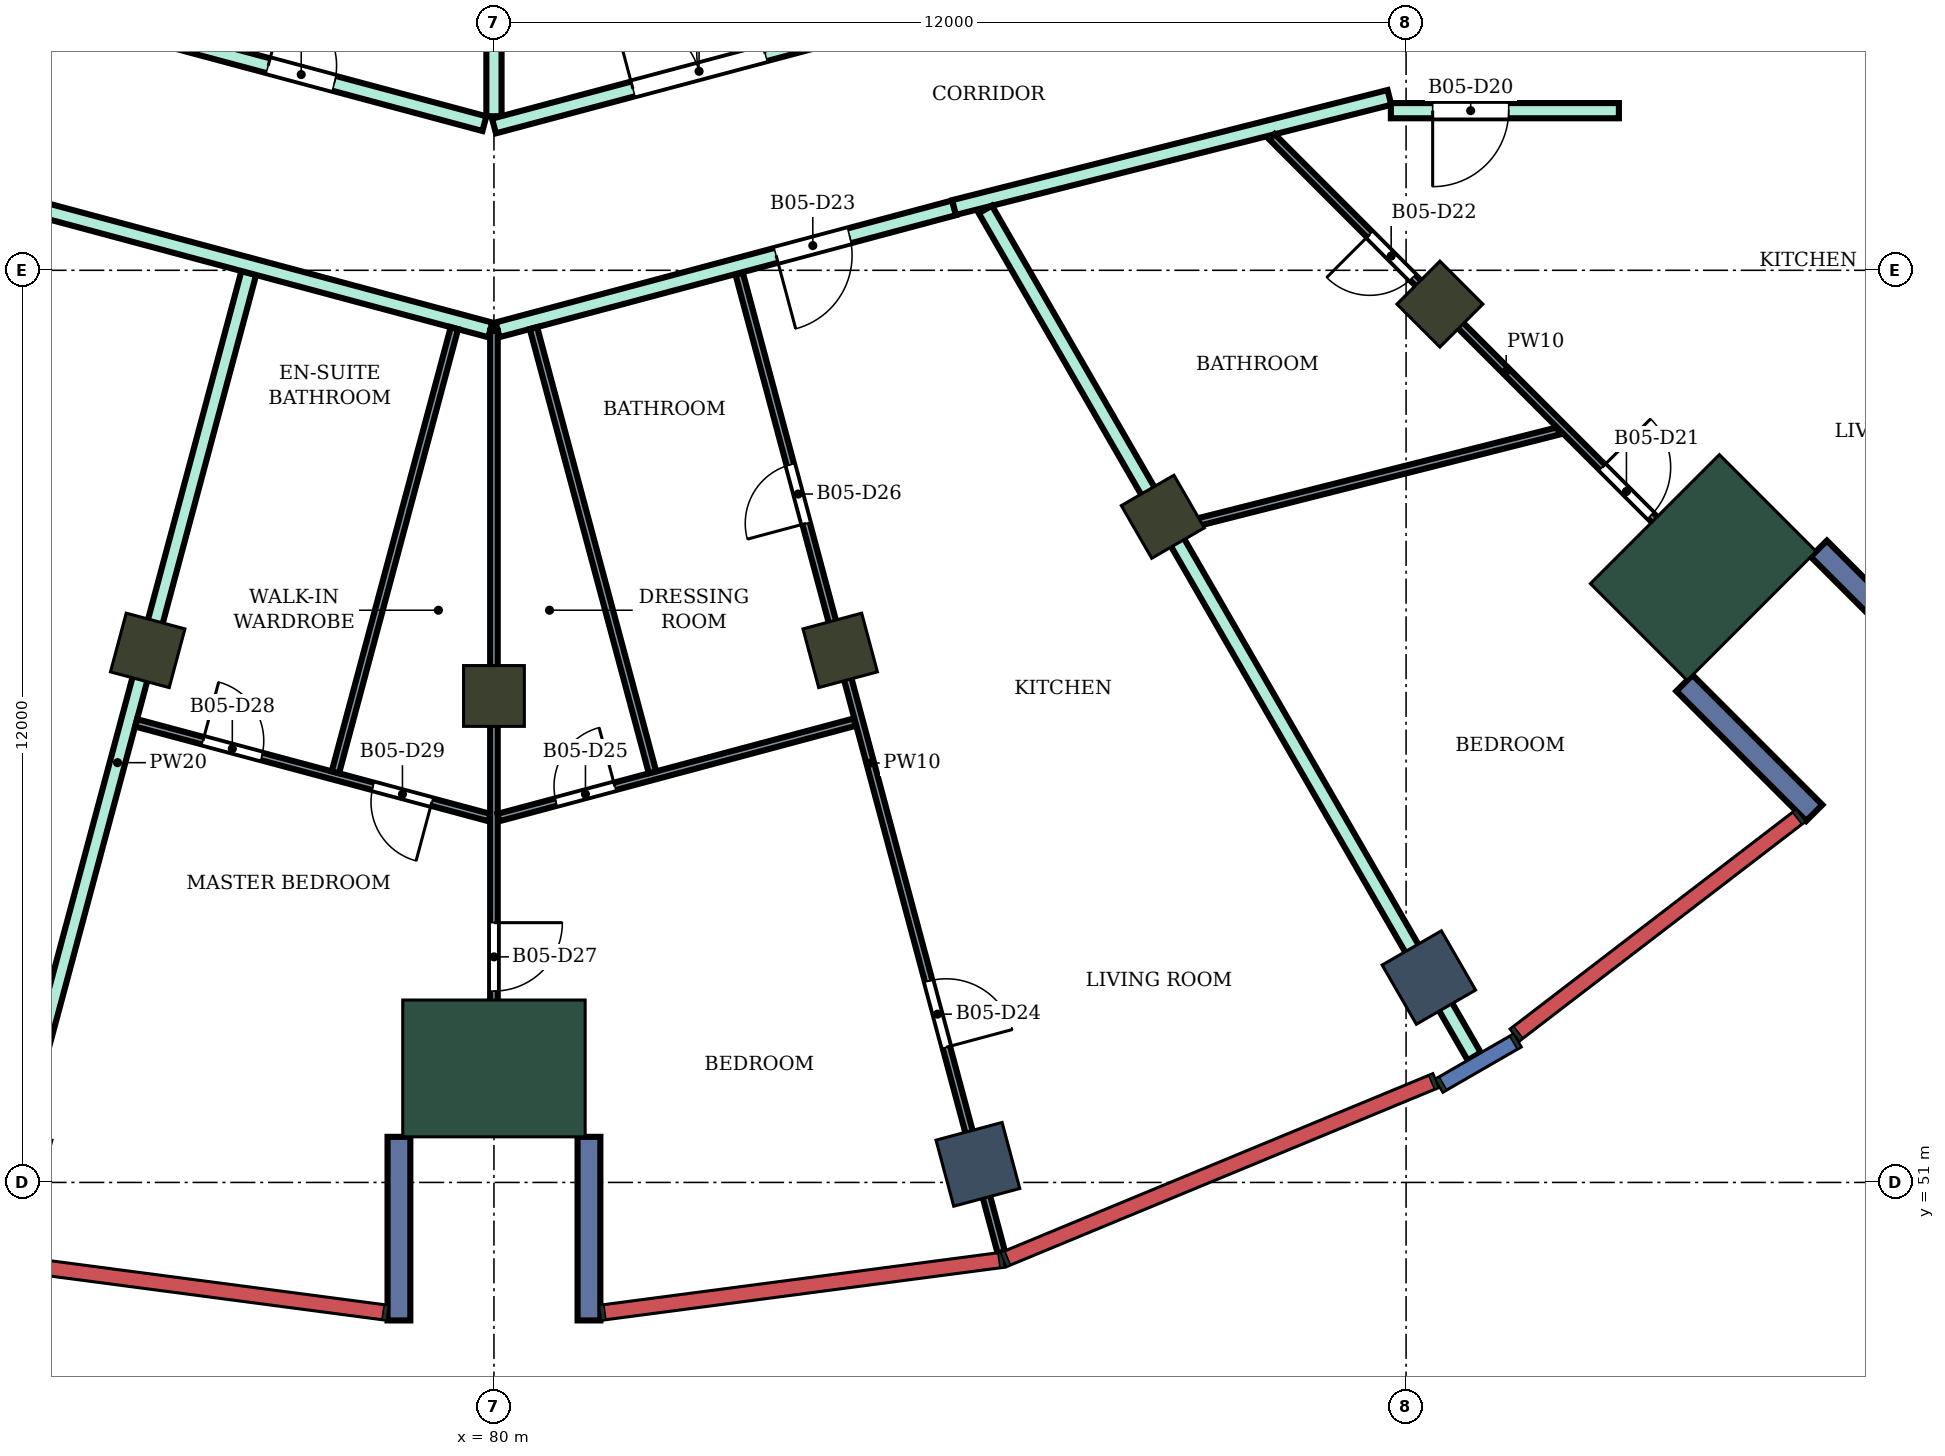
"""IFC4 building model, lengths in metres.
Left out: names, types, materials, properties, quantities, classifications, styles, units other than length and angle.
Written with IfcOpenShell. Run it as: python <this file> out.ifc"""

import sys

from ifc_helpers import new_model, si_unit, direction, frame, frame_2d, origin, origin_2d, place, context, subcontext, project, spatial, rectangle, extrude, element, fill, save


model = new_model("IFC4")
c1 = context("Model", 3, precision=1e-05, world=origin(), true_north=direction((0.0, 1.0)))
c2 = subcontext(c1, "Body", "Model", "MODEL_VIEW")
j1 = project(units=[si_unit("LENGTHUNIT", "METRE"), si_unit("PLANEANGLEUNIT", "RADIAN")], contexts=[c1])
p1 = place(None, origin())
s1 = spatial("IfcSite", under=j1, at=p1, CompositionType="ELEMENT")
p2 = place(p1, origin())
s2 = spatial("IfcBuilding", under=s1, at=p2, CompositionType="ELEMENT")
p3 = place(p2, frame((0.0, 0.0, 266.7)))
s3 = spatial("IfcBuildingStorey", under=s2, at=p3, CompositionType="ELEMENT", Elevation=266.7)
for number, where, z_axis, x_axis in (
    (1, (86.367, 51.238, 0.0), (0.0, 0.0, 1.0), (0.259, -0.966, 0.0)),
    (2, (92.3, 53.696, 0.0), (0.0, 0.0, 1.0), (0.5, -0.866, 0.0)),
):
    element("IfcColumn", number, at=place(p3, frame(where, z_axis=z_axis, x_axis=x_axis)), inside=s3, PredefinedType="COLUMN", context=c2, shape_type="SweptSolid", body=[
        extrude(rectangle(XDim=0.9, YDim=0.9, at=origin_2d()), origin(), (0.0, 0.0, 1.0), 4.2),
    ])
for number, where, z_axis, x_axis in (
    (3, (75.445, 58.0, 0.0), (0.0, 0.0, 1.0), (-0.259, -0.966, 0.0)),
    (4, (80.0, 57.4, 0.0), (0.0, 0.0, 1.0), (0.0, -1.0, 0.0)),
    (5, (84.555, 58.0, 0.0), (0.0, 0.0, 1.0), (0.259, -0.966, 0.0)),
    (6, (88.8, 59.758, 0.0), (0.0, 0.0, 1.0), (0.5, -0.866, 0.0)),
    (7, (92.445, 62.555, 0.0), (0.0, 0.0, 1.0), (0.707, -0.707, 0.0)),
):
    element("IfcColumn", number, at=place(p3, frame(where, z_axis=z_axis, x_axis=x_axis)), inside=s3, PredefinedType="COLUMN", context=c2, shape_type="SweptSolid", body=[
        extrude(rectangle(XDim=0.8, YDim=0.8, at=origin_2d()), origin(), (0.0, 0.0, 1.0), 4.2),
    ])
for number, where, z_axis, x_axis in (
    (8, (80.0, 52.5, 0.0), (0.0, 0.0, 1.0), (0.0, -1.0, 0.0)),
    (9, (95.91, 59.09, 0.0), (0.0, 0.0, 1.0), (0.707, -0.707, 0.0)),
):
    element("IfcColumn", number, at=place(p3, frame(where, z_axis=z_axis, x_axis=x_axis)), inside=s3, PredefinedType="COLUMN", context=c2, shape_type="SweptSolid", body=[
        extrude(rectangle(XDim=1.8, YDim=2.4, at=origin_2d()), origin(), (0.0, 0.0, 1.0), 4.2),
    ])
for number, where, z_axis, x_axis in (
    (10, (78.75, 51.6, 0.0), (0.0, 0.0, 1.0), (0.0, -1.0, 0.0)),
    (11, (81.25, 51.6, 0.0), (0.0, 0.0, 1.0), (0.0, -1.0, 0.0)),
    (12, (95.662, 57.57, 0.0), (0.0, 0.0, 1.0), (0.707, -0.707, 0.0)),
    (13, (97.43, 59.338, 0.0), (0.0, 0.0, 1.0), (0.707, -0.707, 0.0)),
):
    element("IfcWall", number, at=place(p3, frame(where, z_axis=z_axis, x_axis=x_axis)), inside=s3, PredefinedType="NOTDEFINED", context=c2, shape_type="SweptSolid", body=[
        extrude(rectangle(XDim=2.416, YDim=0.3, at=frame_2d((1.208, 0.0))), origin(), (0.0, 0.0, 1.0), 4.2),
    ])
p4 = place(p3, frame((73.32, 50.082, 0.0), z_axis=(0.0, 0.0, 1.0), x_axis=(0.258966962665, 0.965886179758, 0.0)))
e14 = element("IfcWall", 14, at=p4, inside=s3, PredefinedType="PARTITIONING", context=c2, shape_type="SweptSolid", body=[
    extrude(rectangle(XDim=13.337, YDim=0.2, at=frame_2d((6.668, 0.0))), origin(), (0.0, 0.0, 1.0), 3.75),
])
p5 = place(p3, frame((73.947, 63.826, 0.0), z_axis=(0.0, 0.0, 1.0), x_axis=(0.965856500469, -0.259077634122, 0.0)))
e15 = element("IfcWall", 15, at=p5, inside=s3, PredefinedType="PARTITIONING", context=c2, shape_type="SweptSolid", body=[
    extrude(rectangle(XDim=6.217, YDim=0.2, at=frame_2d((3.108, 0.0))), origin(), (0.0, 0.0, 1.0), 3.75),
])
p6 = place(p3, frame((74.603, 66.342, 0.0), z_axis=(0.0, 0.0, 1.0), x_axis=(0.965920893652, -0.258837453254, 0.0)))
e16 = element("IfcWall", 16, at=p6, inside=s3, PredefinedType="PARTITIONING", context=c2, shape_type="SweptSolid", body=[
    extrude(rectangle(XDim=5.458, YDim=0.2, at=frame_2d((2.729, 0.0))), origin(), (0.0, 0.0, 1.0), 3.75),
])
p7 = place(p6, frame((2.512, 0.0, 0.0)))
e17 = element("IfcOpeningElement", 17, at=p7, cuts=e16, PredefinedType="OPENING", context=c2, shape_type="SweptSolid", body=[
    extrude(rectangle(XDim=0.9, YDim=2.1, at=frame_2d((0.45, 1.05))), frame((0.0, 0.11, 0.0), z_axis=(0.0, -1.0, 0.0), x_axis=(1.0, 0.0, 0.0)), (0.0, 0.0, 1.0), 0.22),
])
p8 = place(p3, frame((80.048, 62.217, 0.0), z_axis=(0.0, 0.0, 1.0), x_axis=(0.966097920642, 0.258175923996, 0.0)))
e18 = element("IfcWall", 18, at=p8, inside=s3, PredefinedType="PARTITIONING", context=c2, shape_type="SweptSolid", body=[
    extrude(rectangle(XDim=6.217, YDim=0.2, at=frame_2d((3.108, 0.0))), origin(), (0.0, 0.0, 1.0), 3.75),
])
p9 = place(p8, frame((3.792, 0.0, 0.0)))
e19 = element("IfcOpeningElement", 19, at=p9, cuts=e18, PredefinedType="OPENING", context=c2, shape_type="SweptSolid", body=[
    extrude(rectangle(XDim=1.0, YDim=2.1, at=frame_2d((0.5, 1.05))), frame((0.0, 0.11, 0.0), z_axis=(0.0, -1.0, 0.0), x_axis=(1.0, 0.0, 0.0)), (0.0, 0.0, 1.0), 0.22),
])
p10 = place(p3, frame((80.0, 65.027, 0.0), z_axis=(0.0, 0.0, 1.0), x_axis=(0.0, 1.0, 0.0)))
e20 = element("IfcWall", 20, at=p10, inside=s3, PredefinedType="PARTITIONING", context=c2, shape_type="SweptSolid", body=[
    extrude(rectangle(XDim=2.273, YDim=0.2, at=frame_2d((1.136, 0.0))), origin(), (0.0, 0.0, 1.0), 3.75),
])
p11 = place(p3, frame((80.0, 64.898, 0.0), z_axis=(0.0, 0.0, 1.0), x_axis=(0.966236923997, 0.25765520896, 0.0)))
e21 = element("IfcWall", 21, at=p11, inside=s3, PredefinedType="PARTITIONING", context=c2, shape_type="SweptSolid", body=[
    extrude(rectangle(XDim=8.168, YDim=0.2, at=frame_2d((4.084, 0.0))), origin(), (0.0, 0.0, 1.0), 3.75),
])
p12 = place(p11, frame((1.893, 0.0, 0.0)))
e22 = element("IfcOpeningElement", 22, at=p12, cuts=e21, PredefinedType="OPENING", context=c2, shape_type="SweptSolid", body=[
    extrude(rectangle(XDim=1.8, YDim=2.1, at=frame_2d((0.9, 1.05))), frame((0.0, 0.11, 0.0), z_axis=(0.0, -1.0, 0.0), x_axis=(1.0, 0.0, 0.0)), (0.0, 0.0, 1.0), 0.22),
])
p13 = place(p3, frame((86.053, 63.826, 0.0), z_axis=(0.0, 0.0, 1.0), x_axis=(0.969490004987, 0.245130843083, 0.0)))
e23 = element("IfcWall", 23, at=p13, inside=s3, PredefinedType="PARTITIONING", context=c2, shape_type="SweptSolid", body=[
    extrude(rectangle(XDim=5.908, YDim=0.2, at=frame_2d((2.954, 0.0))), origin(), (0.0, 0.0, 1.0), 3.75),
])
p14 = place(p3, frame((86.465, 63.801, 0.0), z_axis=(0.0, 0.0, 1.0), x_axis=(0.499914633865, -0.866074684336, 0.0)))
e24 = element("IfcWall", 24, at=p14, inside=s3, PredefinedType="PARTITIONING", context=c2, shape_type="SweptSolid", body=[
    extrude(rectangle(XDim=12.866, YDim=0.2, at=frame_2d((6.433, 0.0))), origin(), (0.0, 0.0, 1.0), 3.75),
])
p15 = place(p3, frame((91.8, 65.1, 0.0), z_axis=(0.0, 0.0, 1.0), x_axis=(1.0, 0.0, 0.0)))
e25 = element("IfcWall", 25, at=p15, inside=s3, PredefinedType="PARTITIONING", context=c2, shape_type="SweptSolid", body=[
    extrude(rectangle(XDim=3.0, YDim=0.2, at=frame_2d((1.5, 0.0))), origin(), (0.0, 0.0, 1.0), 3.75),
])
p16 = place(p15, frame((0.55, 0.0, 0.0)))
e26 = element("IfcOpeningElement", 26, at=p16, cuts=e25, PredefinedType="OPENING", context=c2, shape_type="SweptSolid", body=[
    extrude(rectangle(XDim=1.0, YDim=2.1, at=frame_2d((0.5, 1.05))), frame((0.0, 0.11, 0.0), z_axis=(0.0, -1.0, 0.0), x_axis=(1.0, 0.0, 0.0)), (0.0, 0.0, 1.0), 0.22),
])
p17 = place(p3, frame((75.293, 57.046, 0.0), z_axis=(0.0, 0.0, 1.0), x_axis=(0.965904119246, -0.258900043306, 0.0)))
e27 = element("IfcWall", 27, at=p17, inside=s3, PredefinedType="PARTITIONING", context=c2, shape_type="SweptSolid", body=[
    extrude(rectangle(XDim=4.813, YDim=0.1, at=frame_2d((2.406, 0.0))), origin(), (0.0, 0.0, 1.0), 3.75),
])
p18 = place(p17, frame((0.91, 0.0, 0.0)))
e28 = element("IfcOpeningElement", 28, at=p18, cuts=e27, PredefinedType="OPENING", context=c2, shape_type="SweptSolid", body=[
    extrude(rectangle(XDim=0.8, YDim=2.1, at=frame_2d((0.4, 1.05))), frame((0.0, 0.06, 0.0), z_axis=(0.0, -1.0, 0.0), x_axis=(1.0, 0.0, 0.0)), (0.0, 0.0, 1.0), 0.12),
])
p19 = place(p17, frame((3.227, 0.0, 0.0)))
e29 = element("IfcOpeningElement", 29, at=p19, cuts=e27, PredefinedType="OPENING", context=c2, shape_type="SweptSolid", body=[
    extrude(rectangle(XDim=0.8, YDim=2.1, at=frame_2d((0.4, 1.05))), frame((0.0, 0.06, 0.0), z_axis=(0.0, -1.0, 0.0), x_axis=(1.0, 0.0, 0.0)), (0.0, 0.0, 1.0), 0.12),
])
p20 = place(p3, frame((77.914, 56.396, 0.0), z_axis=(0.0, 0.0, 1.0), x_axis=(0.258822816874, 0.965924815638, 0.0)))
e30 = element("IfcWall", 30, at=p20, inside=s3, PredefinedType="PARTITIONING", context=c2, shape_type="SweptSolid", body=[
    extrude(rectangle(XDim=6.05, YDim=0.1, at=frame_2d((3.025, 0.0))), origin(), (0.0, 0.0, 1.0), 3.75),
])
p21 = place(p3, frame((80.0, 51.8, 0.0), z_axis=(0.0, 0.0, 1.0), x_axis=(0.0, 1.0, 0.0)))
e31 = element("IfcWall", 31, at=p21, inside=s3, PredefinedType="PARTITIONING", context=c2, shape_type="SweptSolid", body=[
    extrude(rectangle(XDim=10.404, YDim=0.1, at=frame_2d((5.202, 0.0))), origin(), (0.0, 0.0, 1.0), 3.75),
])
p22 = place(p21, frame((1.718, 0.0, 0.0)))
e32 = element("IfcOpeningElement", 32, at=p22, cuts=e31, PredefinedType="OPENING", context=c2, shape_type="SweptSolid", body=[
    extrude(rectangle(XDim=0.9, YDim=2.1, at=frame_2d((0.45, 1.05))), frame((0.0, 0.06, 0.0), z_axis=(0.0, -1.0, 0.0), x_axis=(1.0, 0.0, 0.0)), (0.0, 0.0, 1.0), 0.12),
])
p23 = place(p3, frame((80.058, 55.801, 0.0), z_axis=(0.0, 0.0, 1.0), x_axis=(0.965968926881, 0.258658137896, 0.0)))
e33 = element("IfcWall", 33, at=p23, inside=s3, PredefinedType="PARTITIONING", context=c2, shape_type="SweptSolid", body=[
    extrude(rectangle(XDim=4.854, YDim=0.1, at=frame_2d((2.427, 0.0))), origin(), (0.0, 0.0, 1.0), 3.75),
])
p24 = place(p23, frame((0.786, 0.0, 0.0)))
e34 = element("IfcOpeningElement", 34, at=p24, cuts=e33, PredefinedType="OPENING", context=c2, shape_type="SweptSolid", body=[
    extrude(rectangle(XDim=0.8, YDim=2.1, at=frame_2d((0.4, 1.05))), frame((0.0, 0.06, 0.0), z_axis=(0.0, -1.0, 0.0), x_axis=(1.0, 0.0, 0.0)), (0.0, 0.0, 1.0), 0.12),
])
p25 = place(p3, frame((80.52, 62.24, 0.0), z_axis=(0.0, 0.0, 1.0), x_axis=(0.258822816874, -0.965924815638, 0.0)))
e35 = element("IfcWall", 35, at=p25, inside=s3, PredefinedType="PARTITIONING", context=c2, shape_type="SweptSolid", body=[
    extrude(rectangle(XDim=6.05, YDim=0.1, at=frame_2d((3.025, 0.0))), origin(), (0.0, 0.0, 1.0), 3.75),
])
p26 = place(p3, frame((83.226, 62.954, 0.0), z_axis=(0.0, 0.0, 1.0), x_axis=(0.258737611245, -0.965947642746, 0.0)))
e36 = element("IfcWall", 36, at=p26, inside=s3, PredefinedType="PARTITIONING", context=c2, shape_type="SweptSolid", body=[
    extrude(rectangle(XDim=13.328, YDim=0.1, at=frame_2d((6.664, 0.0))), origin(), (0.0, 0.0, 1.0), 3.75),
])
p27 = place(p26, frame((9.634, 0.0, 0.0)))
e37 = element("IfcOpeningElement", 37, at=p27, cuts=e36, PredefinedType="OPENING", context=c2, shape_type="SweptSolid", body=[
    extrude(rectangle(XDim=0.9, YDim=2.1, at=frame_2d((0.45, 1.05))), frame((0.0, 0.06, 0.0), z_axis=(0.0, -1.0, 0.0), x_axis=(1.0, 0.0, 0.0)), (0.0, 0.0, 1.0), 0.12),
])
p28 = place(p26, frame((2.6, 0.0, 0.0)))
e38 = element("IfcOpeningElement", 38, at=p28, cuts=e36, PredefinedType="OPENING", context=c2, shape_type="SweptSolid", body=[
    extrude(rectangle(XDim=0.8, YDim=2.1, at=frame_2d((0.4, 1.05))), frame((0.0, 0.06, 0.0), z_axis=(0.0, -1.0, 0.0), x_axis=(1.0, 0.0, 0.0)), (0.0, 0.0, 1.0), 0.12),
])
p29 = place(p3, frame((89.002, 59.621, 0.0), z_axis=(0.0, 0.0, 1.0), x_axis=(0.969445576262, 0.245306491285, 0.0)))
e39 = element("IfcWall", 39, at=p29, inside=s3, PredefinedType="PARTITIONING", context=c2, shape_type="SweptSolid", body=[
    extrude(rectangle(XDim=5.16, YDim=0.1, at=frame_2d((2.58, 0.0))), origin(), (0.0, 0.0, 1.0), 3.75),
])
p30 = place(p3, frame((90.235, 64.757, 0.0), z_axis=(0.0, 0.0, 1.0), x_axis=(0.706924769926, -0.707288745609, 0.0)))
e40 = element("IfcWall", 40, at=p30, inside=s3, PredefinedType="PARTITIONING", context=c2, shape_type="SweptSolid", body=[
    extrude(rectangle(XDim=8.72, YDim=0.1, at=frame_2d((4.36, 0.0))), origin(), (0.0, 0.0, 1.0), 3.75),
])
p31 = place(p30, frame((6.148, 0.0, 0.0)))
e41 = element("IfcOpeningElement", 41, at=p31, cuts=e40, PredefinedType="OPENING", context=c2, shape_type="SweptSolid", body=[
    extrude(rectangle(XDim=0.9, YDim=2.1, at=frame_2d((0.45, 1.05))), frame((0.0, 0.06, 0.0), z_axis=(0.0, -1.0, 0.0), x_axis=(1.0, 0.0, 0.0)), (0.0, 0.0, 1.0), 0.12),
])
p32 = place(p30, frame((1.819, 0.0, 0.0)))
e42 = element("IfcOpeningElement", 42, at=p32, cuts=e40, PredefinedType="OPENING", context=c2, shape_type="SweptSolid", body=[
    extrude(rectangle(XDim=0.8, YDim=2.1, at=frame_2d((0.4, 1.05))), frame((0.0, 0.06, 0.0), z_axis=(0.0, -1.0, 0.0), x_axis=(1.0, 0.0, 0.0)), (0.0, 0.0, 1.0), 0.12),
])
p33 = place(p16, frame((1.0, 0.0, 0.0), z_axis=(0.0, 0.0, 1.0), x_axis=(-1.0, 0.0, 0.0)))
e43 = element("IfcDoor", 43, at=p33, inside=s3, OperationType="SINGLE_SWING_RIGHT", PredefinedType="DOOR", context=c2, shape_type="SweptSolid", body=[
    extrude(rectangle(XDim=1.0, YDim=2.1, at=frame_2d((0.5, 1.05))), frame((0.0, 0.025, 0.0), z_axis=(0.0, -1.0, 0.0), x_axis=(1.0, 0.0, 0.0)), (0.0, 0.0, 1.0), 0.05),
])
fill(e26, e43)
p34 = place(p31, origin())
e44 = element("IfcDoor", 44, at=p34, inside=s3, OperationType="SINGLE_SWING_LEFT", PredefinedType="DOOR", context=c2, shape_type="SweptSolid", body=[
    extrude(rectangle(XDim=0.9, YDim=2.1, at=frame_2d((0.45, 1.05))), frame((0.0, 0.025, 0.0), z_axis=(0.0, -1.0, 0.0), x_axis=(1.0, 0.0, 0.0)), (0.0, 0.0, 1.0), 0.05),
])
fill(e41, e44)
p35 = place(p32, frame((0.8, 0.0, 0.0), z_axis=(0.0, 0.0, 1.0), x_axis=(-1.0, 0.0, 0.0)))
e45 = element("IfcDoor", 45, at=p35, inside=s3, OperationType="SINGLE_SWING_RIGHT", PredefinedType="DOOR", context=c2, shape_type="SweptSolid", body=[
    extrude(rectangle(XDim=0.8, YDim=2.1, at=frame_2d((0.4, 1.05))), frame((0.0, 0.025, 0.0), z_axis=(0.0, -1.0, 0.0), x_axis=(1.0, 0.0, 0.0)), (0.0, 0.0, 1.0), 0.05),
])
fill(e42, e45)
p36 = place(p9, frame((1.0, 0.0, 0.0), z_axis=(0.0, 0.0, 1.0), x_axis=(-1.0, 0.0, 0.0)))
e46 = element("IfcDoor", 46, at=p36, inside=s3, OperationType="SINGLE_SWING_RIGHT", PredefinedType="DOOR", context=c2, shape_type="SweptSolid", body=[
    extrude(rectangle(XDim=1.0, YDim=2.1, at=frame_2d((0.5, 1.05))), frame((0.0, 0.025, 0.0), z_axis=(0.0, -1.0, 0.0), x_axis=(1.0, 0.0, 0.0)), (0.0, 0.0, 1.0), 0.05),
])
fill(e19, e46)
p37 = place(p27, origin())
e47 = element("IfcDoor", 47, at=p37, inside=s3, OperationType="SINGLE_SWING_RIGHT", PredefinedType="DOOR", context=c2, shape_type="SweptSolid", body=[
    extrude(rectangle(XDim=0.9, YDim=2.1, at=frame_2d((0.45, 1.05))), frame((0.0, 0.025, 0.0), z_axis=(0.0, -1.0, 0.0), x_axis=(1.0, 0.0, 0.0)), (0.0, 0.0, 1.0), 0.05),
])
fill(e37, e47)
p38 = place(p24, origin())
e48 = element("IfcDoor", 48, at=p38, inside=s3, OperationType="SINGLE_SWING_RIGHT", PredefinedType="DOOR", context=c2, shape_type="SweptSolid", body=[
    extrude(rectangle(XDim=0.8, YDim=2.1, at=frame_2d((0.4, 1.05))), frame((0.0, 0.025, 0.0), z_axis=(0.0, -1.0, 0.0), x_axis=(1.0, 0.0, 0.0)), (0.0, 0.0, 1.0), 0.05),
])
fill(e34, e48)
p39 = place(p28, frame((0.8, 0.0, 0.0), z_axis=(0.0, 0.0, 1.0), x_axis=(-1.0, 0.0, 0.0)))
e49 = element("IfcDoor", 49, at=p39, inside=s3, OperationType="SINGLE_SWING_LEFT", PredefinedType="DOOR", context=c2, shape_type="SweptSolid", body=[
    extrude(rectangle(XDim=0.8, YDim=2.1, at=frame_2d((0.4, 1.05))), frame((0.0, 0.025, 0.0), z_axis=(0.0, -1.0, 0.0), x_axis=(1.0, 0.0, 0.0)), (0.0, 0.0, 1.0), 0.05),
])
fill(e38, e49)
p40 = place(p22, frame((0.9, 0.0, 0.0), z_axis=(0.0, 0.0, 1.0), x_axis=(-1.0, 0.0, 0.0)))
e50 = element("IfcDoor", 50, at=p40, inside=s3, OperationType="SINGLE_SWING_LEFT", PredefinedType="DOOR", context=c2, shape_type="SweptSolid", body=[
    extrude(rectangle(XDim=0.9, YDim=2.1, at=frame_2d((0.45, 1.05))), frame((0.0, 0.025, 0.0), z_axis=(0.0, -1.0, 0.0), x_axis=(1.0, 0.0, 0.0)), (0.0, 0.0, 1.0), 0.05),
])
fill(e32, e50)
p41 = place(p18, origin())
e51 = element("IfcDoor", 51, at=p41, inside=s3, OperationType="SINGLE_SWING_LEFT", PredefinedType="DOOR", context=c2, shape_type="SweptSolid", body=[
    extrude(rectangle(XDim=0.8, YDim=2.1, at=frame_2d((0.4, 1.05))), frame((0.0, 0.025, 0.0), z_axis=(0.0, -1.0, 0.0), x_axis=(1.0, 0.0, 0.0)), (0.0, 0.0, 1.0), 0.05),
])
fill(e28, e51)
p42 = place(p19, frame((0.8, 0.0, 0.0), z_axis=(0.0, 0.0, 1.0), x_axis=(-1.0, 0.0, 0.0)))
e52 = element("IfcDoor", 52, at=p42, inside=s3, OperationType="SINGLE_SWING_LEFT", PredefinedType="DOOR", context=c2, shape_type="SweptSolid", body=[
    extrude(rectangle(XDim=0.8, YDim=2.1, at=frame_2d((0.4, 1.05))), frame((0.0, 0.025, 0.0), z_axis=(0.0, -1.0, 0.0), x_axis=(1.0, 0.0, 0.0)), (0.0, 0.0, 1.0), 0.05),
])
fill(e29, e52)
p43 = place(p12, origin())
e53 = element("IfcDoor", 53, at=p43, inside=s3, OperationType="DOUBLE_DOOR_SINGLE_SWING", PredefinedType="DOOR", context=c2, shape_type="SweptSolid", body=[
    extrude(rectangle(XDim=1.8, YDim=2.1, at=frame_2d((0.9, 1.05))), frame((0.0, 0.025, 0.0), z_axis=(0.0, -1.0, 0.0), x_axis=(1.0, 0.0, 0.0)), (0.0, 0.0, 1.0), 0.05),
])
fill(e22, e53)
p44 = place(p7, origin())
e54 = element("IfcDoor", 54, at=p44, inside=s3, OperationType="SINGLE_SWING_LEFT", PredefinedType="DOOR", context=c2, shape_type="SweptSolid", body=[
    extrude(rectangle(XDim=0.9, YDim=2.1, at=frame_2d((0.45, 1.05))), frame((0.0, 0.025, 0.0), z_axis=(0.0, -1.0, 0.0), x_axis=(1.0, 0.0, 0.0)), (0.0, 0.0, 1.0), 0.05),
])
fill(e17, e54)
save(model, sys.argv[1])
